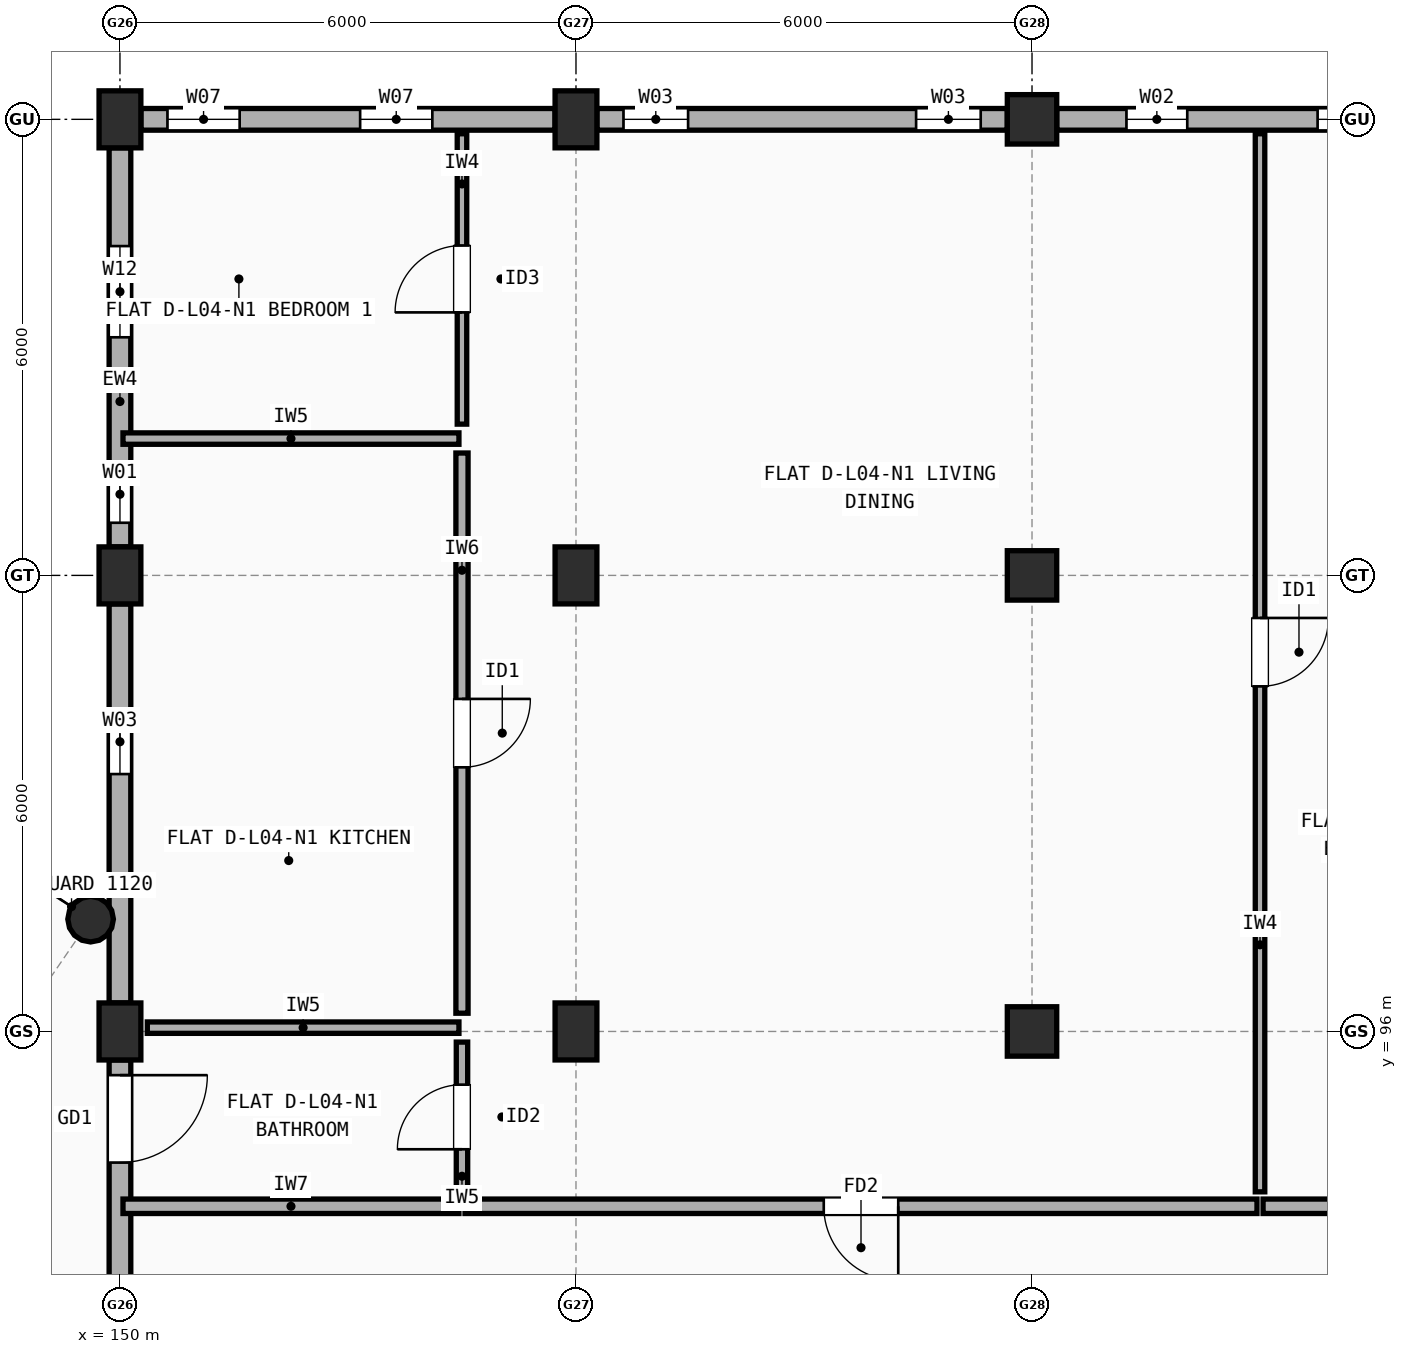
"""IFC4 building model, lengths in metres.
Left out: names, types, materials, properties, quantities, classifications, styles, units other than length and angle.
Written with IfcOpenShell. Run it as: python <this file> out.ifc"""

import sys

from ifc_helpers import new_model, si_unit, direction, frame, frame_2d, origin, origin_2d, place, context, subcontext, project, spatial, rectangle, circle, extrude, element, fill, save


model = new_model("IFC4")
c1 = context("Model", 3, precision=1e-05, world=origin(), true_north=direction((0.0, 1.0)))
c2 = subcontext(c1, "Body", "Model", "MODEL_VIEW")
j1 = project(units=[si_unit("LENGTHUNIT", "METRE"), si_unit("PLANEANGLEUNIT", "RADIAN")], contexts=[c1])
p1 = place(None, origin())
s1 = spatial("IfcSite", under=j1, at=p1, CompositionType="ELEMENT")
p2 = place(p1, origin())
s2 = spatial("IfcBuilding", under=s1, at=p2, CompositionType="ELEMENT")
p3 = place(p2, frame((0.0, 0.0, 14.1)))
s3 = spatial("IfcBuildingStorey", under=s2, at=p3, CompositionType="ELEMENT", Elevation=14.1)
for number, where, z_axis, x_axis in (
    (1, (150.0, 96.0, 0.0), (0.0, 0.0, 1.0), (1.0, 0.0, 0.0)),
    (2, (150.0, 102.0, 0.0), (0.0, 0.0, 1.0), (1.0, 0.0, 0.0)),
    (3, (150.0, 108.0, 0.0), (0.0, 0.0, 1.0), (1.0, 0.0, 0.0)),
    (4, (156.0, 96.0, 0.0), (0.0, 0.0, 1.0), (1.0, 0.0, 0.0)),
    (5, (156.0, 102.0, 0.0), (0.0, 0.0, 1.0), (1.0, 0.0, 0.0)),
    (6, (156.0, 108.0, 0.0), (0.0, 0.0, 1.0), (1.0, 0.0, 0.0)),
):
    element("IfcColumn", number, at=place(p3, frame(where, z_axis=z_axis, x_axis=x_axis)), inside=s3, PredefinedType="COLUMN", context=c2, shape_type="SweptSolid", body=[
        extrude(rectangle(XDim=0.55, YDim=0.75, at=origin_2d()), origin(), (0.0, 0.0, 1.0), 2.95),
    ])
for number, where, z_axis, x_axis in (
    (7, (162.0, 96.0, 0.0), (0.0, 0.0, 1.0), (1.0, 0.0, 0.0)),
    (8, (162.0, 102.0, 0.0), (0.0, 0.0, 1.0), (1.0, 0.0, 0.0)),
    (9, (162.0, 108.0, 0.0), (0.0, 0.0, 1.0), (1.0, 0.0, 0.0)),
):
    element("IfcColumn", number, at=place(p3, frame(where, z_axis=z_axis, x_axis=x_axis)), inside=s3, PredefinedType="COLUMN", context=c2, shape_type="SweptSolid", body=[
        extrude(rectangle(XDim=0.65, YDim=0.65, at=origin_2d()), origin(), (0.0, 0.0, 1.0), 2.95),
    ])
p4 = place(p3, frame((149.614, 97.477, 0.0), z_axis=(0.0, 0.0, 1.0), x_axis=(1.0, 0.0, 0.0)))
e10 = element("IfcColumn", 10, at=p4, inside=s3, PredefinedType="COLUMN", context=c2, shape_type="SweptSolid", body=[
    extrude(circle(Radius=0.3, at=origin_2d()), origin(), (0.0, 0.0, 1.0), 2.948),
])
p5 = place(p3, frame((167.675, 108.0, 0.0), z_axis=(0.0, 0.0, 1.0), x_axis=(-1.0, 0.0, 0.0)))
e11 = element("IfcWall", 11, at=p5, inside=s3, PredefinedType="STANDARD", context=c2, shape_type="SweptSolid", body=[
    extrude(rectangle(XDim=5.35, YDim=0.285, at=frame_2d((2.675, 0.0))), origin(), (0.0, 0.0, 1.0), 2.432),
])
p6 = place(p5, frame((0.718, 0.0, 0.9)))
e12 = element("IfcOpeningElement", 12, at=p6, cuts=e11, PredefinedType="OPENING", context=c2, shape_type="SweptSolid", body=[
    extrude(rectangle(XDim=1.2, YDim=1.35, at=frame_2d((0.6, 0.675))), frame((0.0, 0.152, 0.0), z_axis=(0.0, -1.0, 0.0), x_axis=(1.0, 0.0, 0.0)), (0.0, 0.0, 1.0), 0.305),
])
p7 = place(p5, frame((3.633, 0.0, 0.9)))
e13 = element("IfcOpeningElement", 13, at=p7, cuts=e11, PredefinedType="OPENING", context=c2, shape_type="SweptSolid", body=[
    extrude(rectangle(XDim=0.8, YDim=1.2, at=frame_2d((0.4, 0.6))), frame((0.0, 0.152, 0.0), z_axis=(0.0, -1.0, 0.0), x_axis=(1.0, 0.0, 0.0)), (0.0, 0.0, 1.0), 0.305),
])
p8 = place(p3, frame((161.675, 108.0, 0.0), z_axis=(0.0, 0.0, 1.0), x_axis=(-1.0, 0.0, 0.0)))
e14 = element("IfcWall", 14, at=p8, inside=s3, PredefinedType="STANDARD", context=c2, shape_type="SweptSolid", body=[
    extrude(rectangle(XDim=5.4, YDim=0.285, at=frame_2d((2.7, 0.0))), origin(), (0.0, 0.0, 1.0), 2.432),
])
p9 = place(p8, frame((0.35, 0.0, 0.9)))
e15 = element("IfcOpeningElement", 15, at=p9, cuts=e14, PredefinedType="OPENING", context=c2, shape_type="SweptSolid", body=[
    extrude(rectangle(XDim=0.85, YDim=1.25, at=frame_2d((0.425, 0.625))), frame((0.0, 0.152, 0.0), z_axis=(0.0, -1.0, 0.0), x_axis=(1.0, 0.0, 0.0)), (0.0, 0.0, 1.0), 0.305),
])
p10 = place(p8, frame((4.2, 0.0, 0.9)))
e16 = element("IfcOpeningElement", 16, at=p10, cuts=e14, PredefinedType="OPENING", context=c2, shape_type="SweptSolid", body=[
    extrude(rectangle(XDim=0.85, YDim=1.25, at=frame_2d((0.425, 0.625))), frame((0.0, 0.152, 0.0), z_axis=(0.0, -1.0, 0.0), x_axis=(1.0, 0.0, 0.0)), (0.0, 0.0, 1.0), 0.305),
])
p11 = place(p3, frame((155.725, 108.0, 0.0), z_axis=(0.0, 0.0, 1.0), x_axis=(-1.0, 0.0, 0.0)))
e17 = element("IfcWall", 17, at=p11, inside=s3, PredefinedType="STANDARD", context=c2, shape_type="SweptSolid", body=[
    extrude(rectangle(XDim=5.45, YDim=0.285, at=frame_2d((2.725, 0.0))), origin(), (0.0, 0.0, 1.0), 2.432),
])
p12 = place(p11, frame((1.615, 0.0, 0.9)))
e18 = element("IfcOpeningElement", 18, at=p12, cuts=e17, PredefinedType="OPENING", context=c2, shape_type="SweptSolid", body=[
    extrude(rectangle(XDim=0.95, YDim=1.35, at=frame_2d((0.475, 0.675))), frame((0.0, 0.152, 0.0), z_axis=(0.0, -1.0, 0.0), x_axis=(1.0, 0.0, 0.0)), (0.0, 0.0, 1.0), 0.305),
])
p13 = place(p11, frame((4.15, 0.0, 0.9)))
e19 = element("IfcOpeningElement", 19, at=p13, cuts=e17, PredefinedType="OPENING", context=c2, shape_type="SweptSolid", body=[
    extrude(rectangle(XDim=0.95, YDim=1.35, at=frame_2d((0.475, 0.675))), frame((0.0, 0.152, 0.0), z_axis=(0.0, -1.0, 0.0), x_axis=(1.0, 0.0, 0.0)), (0.0, 0.0, 1.0), 0.305),
])
p14 = place(p3, frame((150.0, 107.625, 0.0), z_axis=(0.0, 0.0, 1.0), x_axis=(0.0, -1.0, 0.0)))
e20 = element("IfcWall", 20, at=p14, inside=s3, PredefinedType="STANDARD", context=c2, shape_type="SweptSolid", body=[
    extrude(rectangle(XDim=5.25, YDim=0.285, at=frame_2d((2.625, 0.0))), origin(), (0.0, 0.0, 1.0), 2.432),
])
p15 = place(p14, frame((1.292, 0.0, 0.9)))
e21 = element("IfcOpeningElement", 21, at=p15, cuts=e20, PredefinedType="OPENING", context=c2, shape_type="SweptSolid", body=[
    extrude(rectangle(XDim=1.2, YDim=1.35, at=frame_2d((0.6, 0.675))), frame((0.0, 0.152, 0.0), z_axis=(0.0, -1.0, 0.0), x_axis=(1.0, 0.0, 0.0)), (0.0, 0.0, 1.0), 0.305),
])
p16 = place(p14, frame((4.183, 0.0, 0.9)))
e22 = element("IfcOpeningElement", 22, at=p16, cuts=e20, PredefinedType="OPENING", context=c2, shape_type="SweptSolid", body=[
    extrude(rectangle(XDim=0.75, YDim=1.15, at=frame_2d((0.375, 0.575))), frame((0.0, 0.152, 0.0), z_axis=(0.0, -1.0, 0.0), x_axis=(1.0, 0.0, 0.0)), (0.0, 0.0, 1.0), 0.305),
])
p17 = place(p3, frame((150.0, 101.625, 0.0), z_axis=(0.0, 0.0, 1.0), x_axis=(0.0, -1.0, 0.0)))
e23 = element("IfcWall", 23, at=p17, inside=s3, PredefinedType="STANDARD", context=c2, shape_type="SweptSolid", body=[
    extrude(rectangle(XDim=5.25, YDim=0.285, at=frame_2d((2.625, 0.0))), origin(), (0.0, 0.0, 1.0), 2.432),
])
p18 = place(p17, frame((1.389, 0.0, 0.9)))
e24 = element("IfcOpeningElement", 24, at=p18, cuts=e23, PredefinedType="OPENING", context=c2, shape_type="SweptSolid", body=[
    extrude(rectangle(XDim=0.85, YDim=1.25, at=frame_2d((0.425, 0.625))), frame((0.0, 0.152, 0.0), z_axis=(0.0, -1.0, 0.0), x_axis=(1.0, 0.0, 0.0)), (0.0, 0.0, 1.0), 0.305),
])
p19 = place(p3, frame((150.0, 95.625, 0.0), z_axis=(0.0, 0.0, 1.0), x_axis=(0.0, -1.0, 0.0)))
e25 = element("IfcWall", 25, at=p19, inside=s3, PredefinedType="STANDARD", context=c2, shape_type="SweptSolid", body=[
    extrude(rectangle(XDim=5.25, YDim=0.285, at=frame_2d((2.625, 0.0))), origin(), (0.0, 0.0, 1.0), 2.432),
])
p20 = place(p19, frame((0.2, 0.0, 0.0)))
e26 = element("IfcOpeningElement", 26, at=p20, cuts=e25, PredefinedType="OPENING", context=c2, shape_type="SweptSolid", body=[
    extrude(rectangle(XDim=1.15, YDim=2.15, at=frame_2d((0.575, 1.075))), frame((0.0, 0.152, 0.0), z_axis=(0.0, -1.0, 0.0), x_axis=(1.0, 0.0, 0.0)), (0.0, 0.0, 1.0), 0.305),
])
p21 = place(p19, frame((3.157, 0.0, 0.9)))
e27 = element("IfcOpeningElement", 27, at=p21, cuts=e25, PredefinedType="OPENING", context=c2, shape_type="SweptSolid", body=[
    extrude(rectangle(XDim=0.9, YDim=1.3, at=frame_2d((0.45, 0.65))), frame((0.0, 0.152, 0.0), z_axis=(0.0, -1.0, 0.0), x_axis=(1.0, 0.0, 0.0)), (0.0, 0.0, 1.0), 0.305),
])
p22 = place(p3, frame((150.04, 93.7, 0.0), z_axis=(0.0, 0.0, 1.0), x_axis=(1.0, 0.0, 0.0)))
e28 = element("IfcWall", 28, at=p22, inside=s3, PredefinedType="SOLIDWALL", context=c2, shape_type="SweptSolid", body=[
    extrude(rectangle(XDim=4.42, YDim=0.19, at=frame_2d((2.21, 0.0))), origin(), (0.0, 0.0, 1.0), 2.432),
])
p23 = place(p3, frame((154.54, 93.7, 0.0), z_axis=(0.0, 0.0, 1.0), x_axis=(1.0, 0.0, 0.0)))
e29 = element("IfcWall", 29, at=p23, inside=s3, PredefinedType="SOLIDWALL", context=c2, shape_type="SweptSolid", body=[
    extrude(rectangle(XDim=10.42, YDim=0.19, at=frame_2d((5.21, 0.0))), origin(), (0.0, 0.0, 1.0), 2.432),
])
p24 = place(p23, frame((4.72, 0.0, 0.0)))
e30 = element("IfcOpeningElement", 30, at=p24, cuts=e29, PredefinedType="OPENING", context=c2, shape_type="SweptSolid", body=[
    extrude(rectangle(XDim=0.98, YDim=2.15, at=frame_2d((0.49, 1.075))), frame((0.0, 0.105, 0.0), z_axis=(0.0, -1.0, 0.0), x_axis=(1.0, 0.0, 0.0)), (0.0, 0.0, 1.0), 0.21),
])
p25 = place(p3, frame((154.5, 103.99, 0.0), z_axis=(0.0, 0.0, 1.0), x_axis=(0.0, 1.0, 0.0)))
e31 = element("IfcWall", 31, at=p25, inside=s3, PredefinedType="PARTITIONING", context=c2, shape_type="SweptSolid", body=[
    extrude(rectangle(XDim=3.82, YDim=0.125, at=frame_2d((1.91, 0.0))), origin(), (0.0, 0.0, 1.0), 2.95),
])
p26 = place(p25, frame((1.47, 0.0, 0.0)))
e32 = element("IfcOpeningElement", 32, at=p26, cuts=e31, PredefinedType="OPENING", context=c2, shape_type="SweptSolid", body=[
    extrude(rectangle(XDim=0.88, YDim=2.1, at=frame_2d((0.44, 1.05))), frame((0.0, 0.073, 0.0), z_axis=(0.0, -1.0, 0.0), x_axis=(1.0, 0.0, 0.0)), (0.0, 0.0, 1.0), 0.145),
])
p27 = place(p3, frame((154.5, 96.24, 0.0), z_axis=(0.0, 0.0, 1.0), x_axis=(0.0, 1.0, 0.0)))
e33 = element("IfcWall", 33, at=p27, inside=s3, PredefinedType="PLUMBINGWALL", context=c2, shape_type="SweptSolid", body=[
    extrude(rectangle(XDim=7.37, YDim=0.16, at=frame_2d((3.685, 0.0))), origin(), (0.0, 0.0, 1.0), 2.432),
])
p28 = place(p27, frame((3.235, 0.0, 0.0)))
e34 = element("IfcOpeningElement", 34, at=p28, cuts=e33, PredefinedType="OPENING", context=c2, shape_type="SweptSolid", body=[
    extrude(rectangle(XDim=0.9, YDim=2.1, at=frame_2d((0.45, 1.05))), frame((0.0, 0.09, 0.0), z_axis=(0.0, -1.0, 0.0), x_axis=(1.0, 0.0, 0.0)), (0.0, 0.0, 1.0), 0.18),
])
p29 = place(p3, frame((154.5, 93.89, 0.0), z_axis=(0.0, 0.0, 1.0), x_axis=(0.0, 1.0, 0.0)))
e35 = element("IfcWall", 35, at=p29, inside=s3, PredefinedType="PARTITIONING", context=c2, shape_type="SweptSolid", body=[
    extrude(rectangle(XDim=1.97, YDim=0.15, at=frame_2d((0.985, 0.0))), origin(), (0.0, 0.0, 1.0), 2.95),
])
p30 = place(p29, frame((0.56, 0.0, 0.0)))
e36 = element("IfcOpeningElement", 36, at=p30, cuts=e35, PredefinedType="OPENING", context=c2, shape_type="SweptSolid", body=[
    extrude(rectangle(XDim=0.85, YDim=2.1, at=frame_2d((0.425, 1.05))), frame((0.0, 0.085, 0.0), z_axis=(0.0, -1.0, 0.0), x_axis=(1.0, 0.0, 0.0)), (0.0, 0.0, 1.0), 0.17),
])
p31 = place(p3, frame((150.04, 103.8, 0.0), z_axis=(0.0, 0.0, 1.0), x_axis=(1.0, 0.0, 0.0)))
e37 = element("IfcWall", 37, at=p31, inside=s3, PredefinedType="PARTITIONING", context=c2, shape_type="SweptSolid", body=[
    extrude(rectangle(XDim=4.42, YDim=0.15, at=frame_2d((2.21, 0.0))), origin(), (0.0, 0.0, 1.0), 2.432),
])
p32 = place(p3, frame((150.36, 96.05, 0.0), z_axis=(0.0, 0.0, 1.0), x_axis=(1.0, 0.0, 0.0)))
e38 = element("IfcWall", 38, at=p32, inside=s3, PredefinedType="PARTITIONING", context=c2, shape_type="SweptSolid", body=[
    extrude(rectangle(XDim=4.1, YDim=0.15, at=frame_2d((2.05, 0.0))), origin(), (0.0, 0.0, 1.0), 2.548),
])
p33 = place(p3, frame((165.04, 93.7, 0.0), z_axis=(0.0, 0.0, 1.0), x_axis=(1.0, 0.0, 0.0)))
e39 = element("IfcWall", 39, at=p33, inside=s3, PredefinedType="SOLIDWALL", context=c2, shape_type="SweptSolid", body=[
    extrude(rectangle(XDim=2.92, YDim=0.19, at=frame_2d((1.46, 0.0))), origin(), (0.0, 0.0, 1.0), 2.508),
])
p34 = place(p3, frame((165.0, 93.89, 0.0), z_axis=(0.0, 0.0, 1.0), x_axis=(0.0, 1.0, 0.0)))
e40 = element("IfcWall", 40, at=p34, inside=s3, PredefinedType="PARTITIONING", context=c2, shape_type="SweptSolid", body=[
    extrude(rectangle(XDim=13.92, YDim=0.125, at=frame_2d((6.96, 0.0))), origin(), (0.0, 0.0, 1.0), 2.408),
])
p35 = place(p34, frame((6.65, 0.0, 0.0)))
e41 = element("IfcOpeningElement", 41, at=p35, cuts=e40, PredefinedType="OPENING", context=c2, shape_type="SweptSolid", body=[
    extrude(rectangle(XDim=0.9, YDim=2.1, at=frame_2d((0.45, 1.05))), frame((0.0, 0.073, 0.0), z_axis=(0.0, -1.0, 0.0), x_axis=(1.0, 0.0, 0.0)), (0.0, 0.0, 1.0), 0.145),
])
p36 = place(p6, origin())
e42 = element("IfcWindow", 42, at=p36, inside=s3, PartitioningType="SINGLE_PANEL", PredefinedType="WINDOW", context=c2, shape_type="SweptSolid", body=[
    extrude(rectangle(XDim=1.2, YDim=1.35, at=frame_2d((0.6, 0.675))), frame((0.0, 0.03, 0.0), z_axis=(0.0, -1.0, 0.0), x_axis=(1.0, 0.0, 0.0)), (0.0, 0.0, 1.0), 0.06),
])
fill(e12, e42)
p37 = place(p7, origin())
e43 = element("IfcWindow", 43, at=p37, inside=s3, PartitioningType="SINGLE_PANEL", PredefinedType="WINDOW", context=c2, shape_type="SweptSolid", body=[
    extrude(rectangle(XDim=0.8, YDim=1.2, at=frame_2d((0.4, 0.6))), frame((0.0, 0.03, 0.0), z_axis=(0.0, -1.0, 0.0), x_axis=(1.0, 0.0, 0.0)), (0.0, 0.0, 1.0), 0.06),
])
fill(e13, e43)
p38 = place(p9, origin())
e44 = element("IfcWindow", 44, at=p38, inside=s3, PartitioningType="SINGLE_PANEL", PredefinedType="WINDOW", context=c2, shape_type="SweptSolid", body=[
    extrude(rectangle(XDim=0.85, YDim=1.25, at=frame_2d((0.425, 0.625))), frame((0.0, 0.03, 0.0), z_axis=(0.0, -1.0, 0.0), x_axis=(1.0, 0.0, 0.0)), (0.0, 0.0, 1.0), 0.06),
])
fill(e15, e44)
p39 = place(p10, origin())
e45 = element("IfcWindow", 45, at=p39, inside=s3, PartitioningType="SINGLE_PANEL", PredefinedType="WINDOW", context=c2, shape_type="SweptSolid", body=[
    extrude(rectangle(XDim=0.85, YDim=1.25, at=frame_2d((0.425, 0.625))), frame((0.0, 0.03, 0.0), z_axis=(0.0, -1.0, 0.0), x_axis=(1.0, 0.0, 0.0)), (0.0, 0.0, 1.0), 0.06),
])
fill(e16, e45)
p40 = place(p12, origin())
e46 = element("IfcWindow", 46, at=p40, inside=s3, PartitioningType="SINGLE_PANEL", PredefinedType="WINDOW", context=c2, shape_type="SweptSolid", body=[
    extrude(rectangle(XDim=0.95, YDim=1.35, at=frame_2d((0.475, 0.675))), frame((0.0, 0.03, 0.0), z_axis=(0.0, -1.0, 0.0), x_axis=(1.0, 0.0, 0.0)), (0.0, 0.0, 1.0), 0.06),
])
fill(e18, e46)
p41 = place(p13, origin())
e47 = element("IfcWindow", 47, at=p41, inside=s3, PartitioningType="SINGLE_PANEL", PredefinedType="WINDOW", context=c2, shape_type="SweptSolid", body=[
    extrude(rectangle(XDim=0.95, YDim=1.35, at=frame_2d((0.475, 0.675))), frame((0.0, 0.03, 0.0), z_axis=(0.0, -1.0, 0.0), x_axis=(1.0, 0.0, 0.0)), (0.0, 0.0, 1.0), 0.06),
])
fill(e19, e47)
p42 = place(p15, origin())
e48 = element("IfcWindow", 48, at=p42, inside=s3, PartitioningType="SINGLE_PANEL", PredefinedType="WINDOW", context=c2, shape_type="SweptSolid", body=[
    extrude(rectangle(XDim=1.2, YDim=1.35, at=frame_2d((0.6, 0.675))), frame((0.0, 0.03, 0.0), z_axis=(0.0, -1.0, 0.0), x_axis=(1.0, 0.0, 0.0)), (0.0, 0.0, 1.0), 0.06),
])
fill(e21, e48)
p43 = place(p16, origin())
e49 = element("IfcWindow", 49, at=p43, inside=s3, PartitioningType="SINGLE_PANEL", PredefinedType="WINDOW", context=c2, shape_type="SweptSolid", body=[
    extrude(rectangle(XDim=0.75, YDim=1.15, at=frame_2d((0.375, 0.575))), frame((0.0, 0.03, 0.0), z_axis=(0.0, -1.0, 0.0), x_axis=(1.0, 0.0, 0.0)), (0.0, 0.0, 1.0), 0.06),
])
fill(e22, e49)
p44 = place(p18, origin())
e50 = element("IfcWindow", 50, at=p44, inside=s3, PartitioningType="SINGLE_PANEL", PredefinedType="WINDOW", context=c2, shape_type="SweptSolid", body=[
    extrude(rectangle(XDim=0.85, YDim=1.25, at=frame_2d((0.425, 0.625))), frame((0.0, 0.03, 0.0), z_axis=(0.0, -1.0, 0.0), x_axis=(1.0, 0.0, 0.0)), (0.0, 0.0, 1.0), 0.06),
])
fill(e24, e50)
p45 = place(p20, frame((1.15, 0.0, 0.0), z_axis=(0.0, 0.0, 1.0), x_axis=(-1.0, 0.0, 0.0)))
e51 = element("IfcDoor", 51, at=p45, inside=s3, OperationType="SINGLE_SWING_LEFT", PredefinedType="DOOR", context=c2, shape_type="SweptSolid", body=[
    extrude(rectangle(XDim=1.15, YDim=2.15, at=frame_2d((0.575, 1.075))), frame((0.0, 0.025, 0.0), z_axis=(0.0, -1.0, 0.0), x_axis=(1.0, 0.0, 0.0)), (0.0, 0.0, 1.0), 0.05),
])
fill(e26, e51)
p46 = place(p24, origin())
e52 = element("IfcDoor", 52, at=p46, inside=s3, OperationType="SINGLE_SWING_RIGHT", PredefinedType="DOOR", context=c2, shape_type="SweptSolid", body=[
    extrude(rectangle(XDim=0.98, YDim=2.15, at=frame_2d((0.49, 1.075))), frame((0.0, 0.025, 0.0), z_axis=(0.0, -1.0, 0.0), x_axis=(1.0, 0.0, 0.0)), (0.0, 0.0, 1.0), 0.05),
])
fill(e30, e52)
p47 = place(p26, origin())
e53 = element("IfcDoor", 53, at=p47, inside=s3, OperationType="SINGLE_SWING_LEFT", PredefinedType="DOOR", context=c2, shape_type="SweptSolid", body=[
    extrude(rectangle(XDim=0.88, YDim=2.1, at=frame_2d((0.44, 1.05))), frame((0.0, 0.025, 0.0), z_axis=(0.0, -1.0, 0.0), x_axis=(1.0, 0.0, 0.0)), (0.0, 0.0, 1.0), 0.05),
])
fill(e32, e53)
p48 = place(p28, origin())
e54 = element("IfcDoor", 54, at=p48, inside=s3, OperationType="SINGLE_SWING_RIGHT", PredefinedType="DOOR", context=c2, shape_type="SweptSolid", body=[
    extrude(rectangle(XDim=0.9, YDim=2.1, at=frame_2d((0.45, 1.05))), frame((0.0, 0.025, 0.0), z_axis=(0.0, -1.0, 0.0), x_axis=(1.0, 0.0, 0.0)), (0.0, 0.0, 1.0), 0.05),
])
fill(e34, e54)
p49 = place(p30, origin())
e55 = element("IfcDoor", 55, at=p49, inside=s3, OperationType="SINGLE_SWING_LEFT", PredefinedType="DOOR", context=c2, shape_type="SweptSolid", body=[
    extrude(rectangle(XDim=0.85, YDim=2.1, at=frame_2d((0.425, 1.05))), frame((0.0, 0.025, 0.0), z_axis=(0.0, -1.0, 0.0), x_axis=(1.0, 0.0, 0.0)), (0.0, 0.0, 1.0), 0.05),
])
fill(e36, e55)
p50 = place(p35, origin())
e56 = element("IfcDoor", 56, at=p50, inside=s3, OperationType="SINGLE_SWING_RIGHT", PredefinedType="DOOR", context=c2, shape_type="SweptSolid", body=[
    extrude(rectangle(XDim=0.9, YDim=2.1, at=frame_2d((0.45, 1.05))), frame((0.0, 0.025, 0.0), z_axis=(0.0, -1.0, 0.0), x_axis=(1.0, 0.0, 0.0)), (0.0, 0.0, 1.0), 0.05),
])
fill(e41, e56)
save(model, sys.argv[1])
